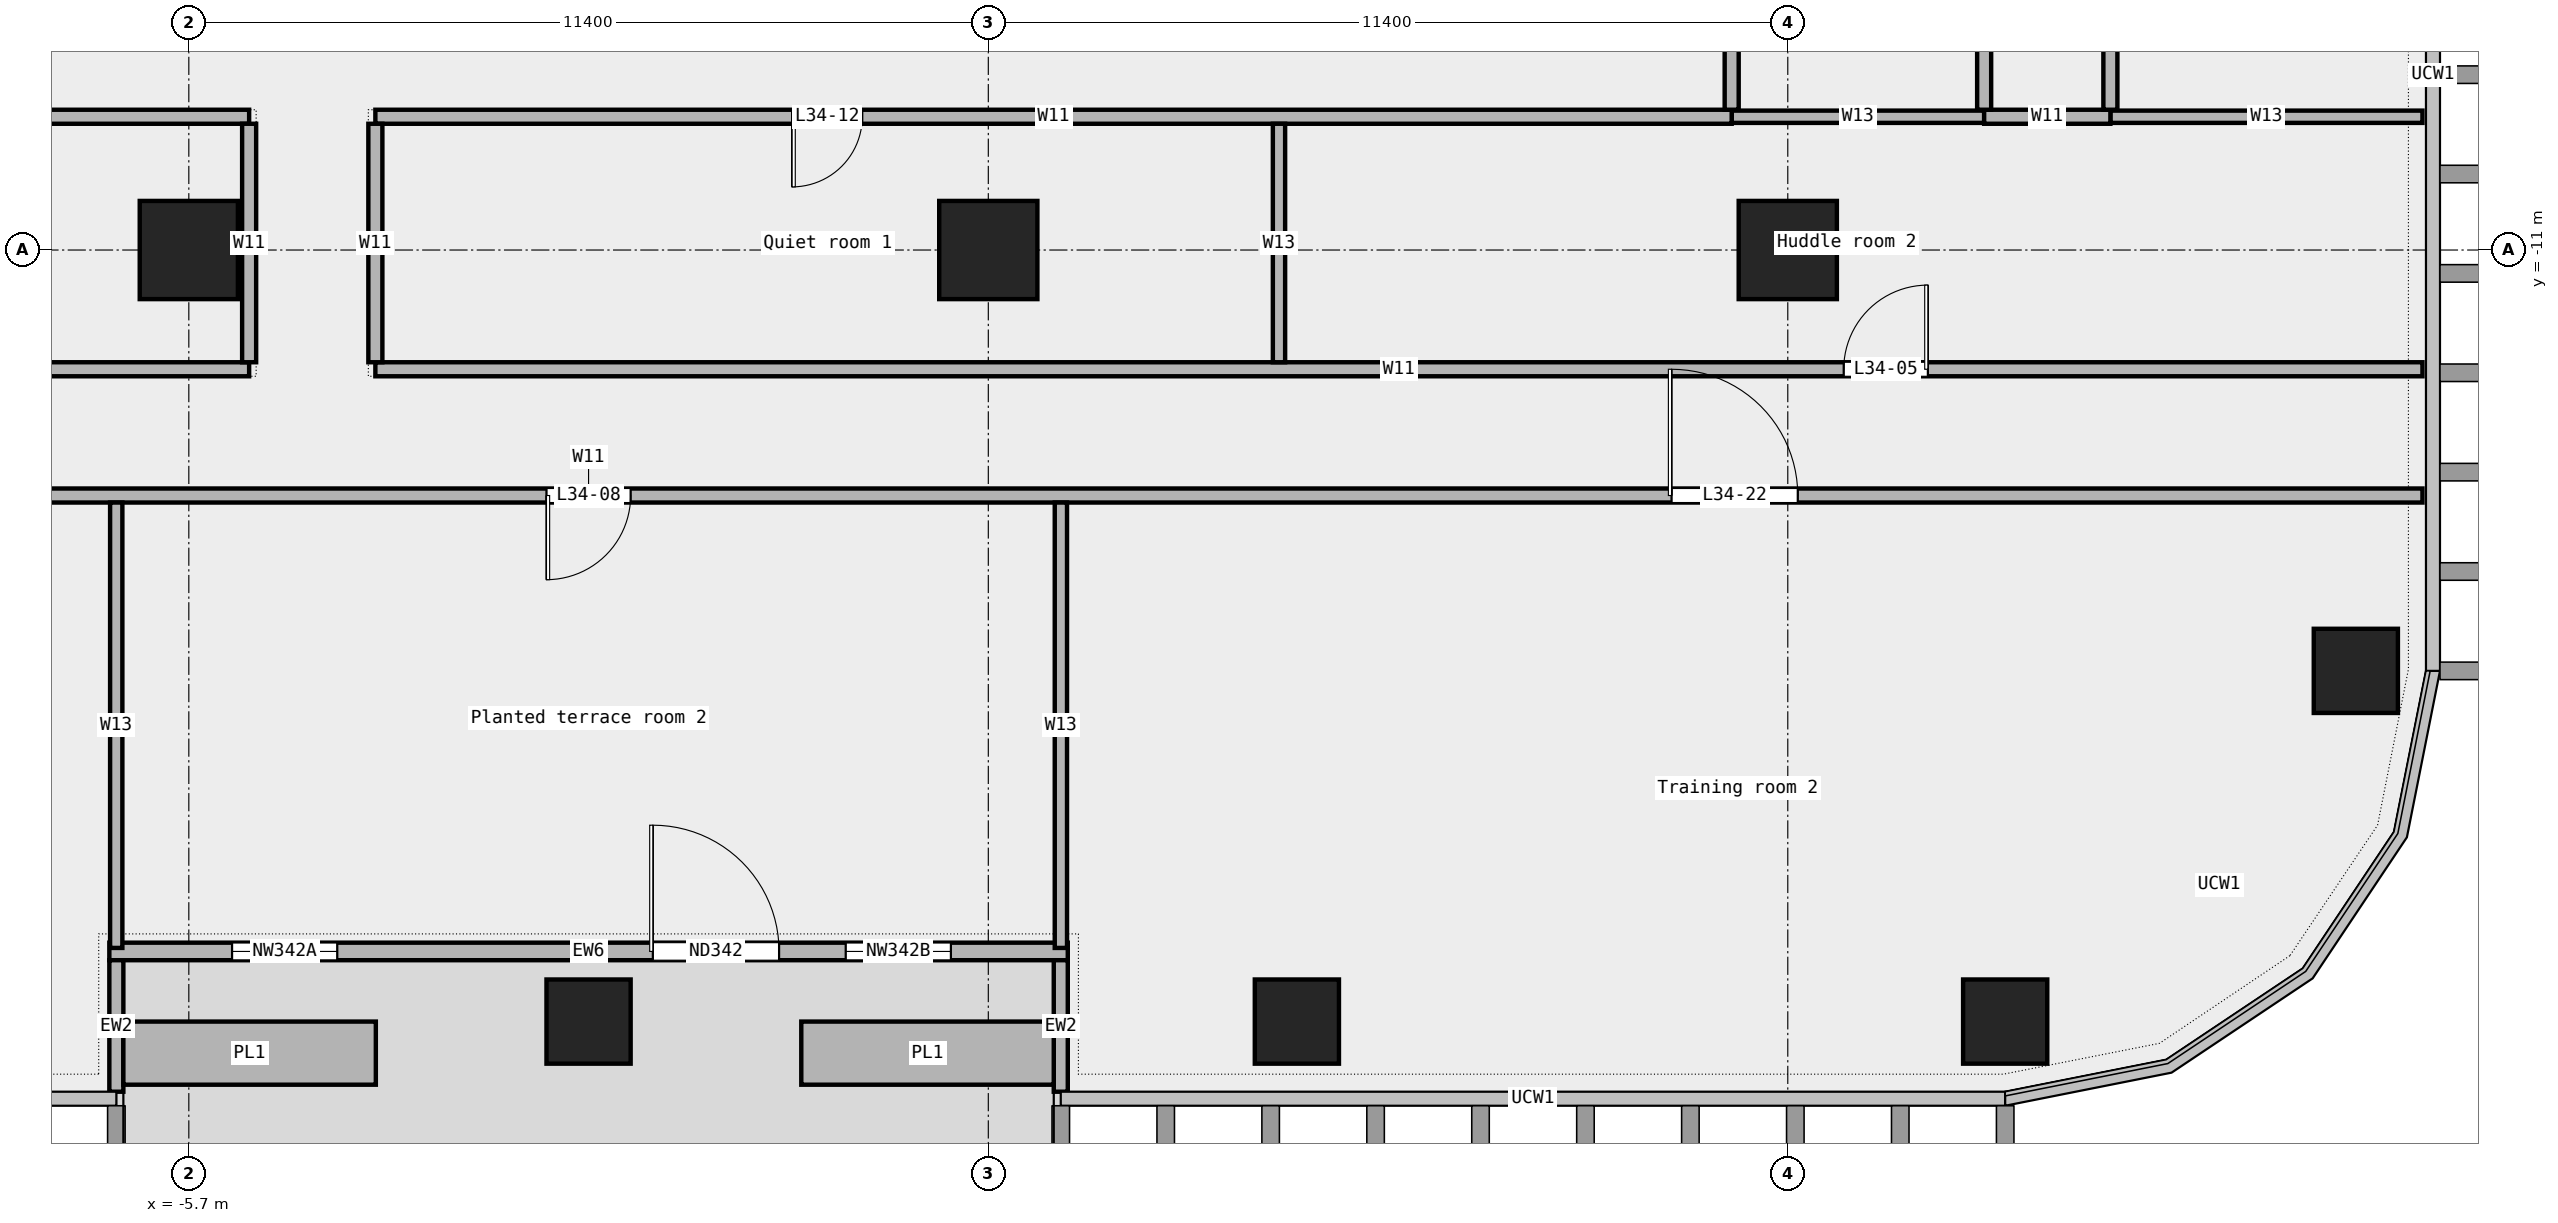
"""IFC4 building model, lengths in metres.
Left out: names, types, materials, properties, quantities, classifications, styles, units other than length and angle.
Written with IfcOpenShell. Run it as: python <this file> out.ifc"""

import sys

from ifc_helpers import new_model, si_unit, direction, frame, frame_2d, origin, origin_2d, place, context, subcontext, project, spatial, rectangle, extrude, element, fill, save


model = new_model("IFC4")
c1 = context("Model", 3, precision=1e-05, world=origin(), true_north=direction((0.0, 1.0)))
c2 = subcontext(c1, "Body", "Model", "MODEL_VIEW")
j1 = project(units=[si_unit("LENGTHUNIT", "METRE"), si_unit("PLANEANGLEUNIT", "RADIAN")], contexts=[c1])
p1 = place(None, origin())
s1 = spatial("IfcSite", under=j1, at=p1, CompositionType="ELEMENT")
p2 = place(p1, origin())
s2 = spatial("IfcBuilding", under=s1, at=p2, CompositionType="ELEMENT")
p3 = place(p2, frame((0.0, 0.0, 169.0)))
s3 = spatial("IfcBuildingStorey", under=s2, at=p3, CompositionType="ELEMENT", Elevation=169.0)
for number, where, z_axis, x_axis in (
    (1, (0.0, -22.0, 0.0), (0.0, 0.0, 1.0), (1.0, 0.0, 0.0)),
    (2, (10.1, -22.0, 0.0), (0.0, 0.0, 1.0), (1.0, 0.0, 0.0)),
    (3, (20.2, -22.0, 0.0), (0.0, 0.0, 1.0), (1.0, 0.0, 0.0)),
    (4, (25.2, -17.0, 0.0), (0.0, 0.0, 1.0), (1.0, 0.0, 0.0)),
):
    element("IfcColumn", number, at=place(p3, frame(where, z_axis=z_axis, x_axis=x_axis)), inside=s3, PredefinedType="COLUMN", context=c2, shape_type="SweptSolid", body=[
        extrude(rectangle(XDim=1.2, YDim=1.2, at=origin_2d()), origin(), (0.0, 0.0, 1.0), 3.6),
    ])
for number, where, z_axis, x_axis in (
    (5, (-5.7, -11.0, 0.0), (0.0, 0.0, 1.0), (1.0, 0.0, 0.0)),
    (6, (5.7, -11.0, 0.0), (0.0, 0.0, 1.0), (1.0, 0.0, 0.0)),
    (7, (17.1, -11.0, 0.0), (0.0, 0.0, 1.0), (1.0, 0.0, 0.0)),
):
    element("IfcColumn", number, at=place(p3, frame(where, z_axis=z_axis, x_axis=x_axis)), inside=s3, PredefinedType="COLUMN", context=c2, shape_type="SweptSolid", body=[
        extrude(rectangle(XDim=1.4, YDim=1.4, at=origin_2d()), origin(), (0.0, 0.0, 1.0), 3.6),
    ])
p4 = place(p3, frame((-6.833, -21.0, 0.0), z_axis=(0.0, 0.0, 1.0), x_axis=(1.0, 0.0, 0.0)))
e8 = element("IfcWall", 8, at=p4, inside=s3, PredefinedType="STANDARD", context=c2, shape_type="SweptSolid", body=[
    extrude(rectangle(XDim=13.667, YDim=0.25, at=frame_2d((6.833, 0.0))), origin(), (0.0, 0.0, 1.0), 3.6),
])
p5 = place(p4, frame((1.75, 0.0, 0.45)))
e9 = element("IfcOpeningElement", 9, at=p5, cuts=e8, PredefinedType="OPENING", context=c2, shape_type="SweptSolid", body=[
    extrude(rectangle(XDim=1.5, YDim=2.4, at=frame_2d((0.75, 1.2))), frame((0.0, 0.137, 0.0), z_axis=(0.0, -1.0, 0.0), x_axis=(1.0, 0.0, 0.0)), (0.0, 0.0, 1.0), 0.274),
])
p6 = place(p4, frame((7.75, 0.0, 0.0)))
e10 = element("IfcOpeningElement", 10, at=p6, cuts=e8, PredefinedType="OPENING", context=c2, shape_type="SweptSolid", body=[
    extrude(rectangle(XDim=1.8, YDim=2.4, at=frame_2d((0.9, 1.2))), frame((0.0, 0.137, 0.0), z_axis=(0.0, -1.0, 0.0), x_axis=(1.0, 0.0, 0.0)), (0.0, 0.0, 1.0), 0.274),
])
p7 = place(p4, frame((10.5, 0.0, 0.45)))
e11 = element("IfcOpeningElement", 11, at=p7, cuts=e8, PredefinedType="OPENING", context=c2, shape_type="SweptSolid", body=[
    extrude(rectangle(XDim=1.5, YDim=2.4, at=frame_2d((0.75, 1.2))), frame((0.0, 0.137, 0.0), z_axis=(0.0, -1.0, 0.0), x_axis=(1.0, 0.0, 0.0)), (0.0, 0.0, 1.0), 0.274),
])
for number, where, z_axis, x_axis in (
    (12, (-6.733, -23.0, 0.0), (0.0, 0.0, 1.0), (0.0, 1.0, 0.0)),
    (13, (6.733, -23.0, 0.0), (0.0, 0.0, 1.0), (0.0, 1.0, 0.0)),
):
    element("IfcWall", number, at=place(p3, frame(where, z_axis=z_axis, x_axis=x_axis)), inside=s3, PredefinedType="STANDARD", context=c2, shape_type="SweptSolid", body=[
        extrude(rectangle(XDim=1.875, YDim=0.2, at=frame_2d((0.938, 0.0))), origin(), (0.0, 0.0, 1.0), 3.6),
    ])
for number, where, z_axis, x_axis in (
    (14, (-6.633, -22.45, 0.0), (0.0, 0.0, 1.0), (1.0, 0.0, 0.0)),
    (15, (3.033, -22.45, 0.0), (0.0, 0.0, 1.0), (1.0, 0.0, 0.0)),
):
    element("IfcWall", number, at=place(p3, frame(where, z_axis=z_axis, x_axis=x_axis)), inside=s3, PredefinedType="STANDARD", context=c2, shape_type="SweptSolid", body=[
        extrude(rectangle(XDim=3.6, YDim=0.9, at=frame_2d((1.8, 0.0))), origin(), (0.0, 0.0, 1.0), 0.7),
    ])
p8 = place(p3, frame((-26.15, -14.5, 0.0), z_axis=(0.0, 0.0, 1.0), x_axis=(1.0, 0.0, 0.0)))
e16 = element("IfcWall", 16, at=p8, inside=s3, PredefinedType="PARTITIONING", context=c2, shape_type="SweptSolid", body=[
    extrude(rectangle(XDim=52.3, YDim=0.2, at=frame_2d((26.15, 0.0))), origin(), (0.0, 0.0, 1.0), 3.6),
])
p9 = place(p8, frame((8.907, 0.0, 0.0)))
e17 = element("IfcOpeningElement", 17, at=p9, cuts=e16, PredefinedType="OPENING", context=c2, shape_type="SweptSolid", body=[
    extrude(rectangle(XDim=1.8, YDim=2.1, at=frame_2d((0.9, 1.05))), frame((0.0, 0.112, 0.0), z_axis=(0.0, -1.0, 0.0), x_axis=(1.0, 0.0, 0.0)), (0.0, 0.0, 1.0), 0.224),
])
p10 = place(p8, frame((25.55, 0.0, 0.0)))
e18 = element("IfcOpeningElement", 18, at=p10, cuts=e16, PredefinedType="OPENING", context=c2, shape_type="SweptSolid", body=[
    extrude(rectangle(XDim=1.2, YDim=2.1, at=frame_2d((0.6, 1.05))), frame((0.0, 0.112, 0.0), z_axis=(0.0, -1.0, 0.0), x_axis=(1.0, 0.0, 0.0)), (0.0, 0.0, 1.0), 0.224),
])
p11 = place(p8, frame((41.593, 0.0, 0.0)))
e19 = element("IfcOpeningElement", 19, at=p11, cuts=e16, PredefinedType="OPENING", context=c2, shape_type="SweptSolid", body=[
    extrude(rectangle(XDim=1.8, YDim=2.1, at=frame_2d((0.9, 1.05))), frame((0.0, 0.112, 0.0), z_axis=(0.0, -1.0, 0.0), x_axis=(1.0, 0.0, 0.0)), (0.0, 0.0, 1.0), 0.224),
])
p12 = place(p3, frame((-26.15, -12.7, 0.0), z_axis=(0.0, 0.0, 1.0), x_axis=(1.0, 0.0, 0.0)))
e20 = element("IfcWall", 20, at=p12, inside=s3, PredefinedType="PARTITIONING", context=c2, shape_type="SweptSolid", body=[
    extrude(rectangle(XDim=21.31, YDim=0.2, at=frame_2d((10.655, 0.0))), origin(), (0.0, 0.0, 1.0), 3.6),
])
p13 = place(p12, frame((3.597, 0.0, 0.0)))
e21 = element("IfcOpeningElement", 21, at=p13, cuts=e20, PredefinedType="OPENING", context=c2, shape_type="SweptSolid", body=[
    extrude(rectangle(XDim=0.9, YDim=2.1, at=frame_2d((0.45, 1.05))), frame((0.0, 0.112, 0.0), z_axis=(0.0, -1.0, 0.0), x_axis=(1.0, 0.0, 0.0)), (0.0, 0.0, 1.0), 0.224),
])
p14 = place(p12, frame((14.002, 0.0, 0.0)))
e22 = element("IfcOpeningElement", 22, at=p14, cuts=e20, PredefinedType="OPENING", context=c2, shape_type="SweptSolid", body=[
    extrude(rectangle(XDim=1.2, YDim=2.1, at=frame_2d((0.6, 1.05))), frame((0.0, 0.112, 0.0), z_axis=(0.0, -1.0, 0.0), x_axis=(1.0, 0.0, 0.0)), (0.0, 0.0, 1.0), 0.224),
])
p15 = place(p3, frame((-3.04, -12.7, 0.0), z_axis=(0.0, 0.0, 1.0), x_axis=(1.0, 0.0, 0.0)))
e23 = element("IfcWall", 23, at=p15, inside=s3, PredefinedType="PARTITIONING", context=c2, shape_type="SweptSolid", body=[
    extrude(rectangle(XDim=29.19, YDim=0.2, at=frame_2d((14.595, 0.0))), origin(), (0.0, 0.0, 1.0), 3.6),
])
p16 = place(p15, frame((20.938, 0.0, 0.0)))
e24 = element("IfcOpeningElement", 24, at=p16, cuts=e23, PredefinedType="OPENING", context=c2, shape_type="SweptSolid", body=[
    extrude(rectangle(XDim=1.2, YDim=2.1, at=frame_2d((0.6, 1.05))), frame((0.0, 0.112, 0.0), z_axis=(0.0, -1.0, 0.0), x_axis=(1.0, 0.0, 0.0)), (0.0, 0.0, 1.0), 0.224),
])
p17 = place(p3, frame((16.3, -9.1, 0.0), z_axis=(0.0, 0.0, 1.0), x_axis=(1.0, 0.0, 0.0)))
e25 = element("IfcWall", 25, at=p17, inside=s3, PredefinedType="PARTITIONING", context=c2, shape_type="SweptSolid", body=[
    extrude(rectangle(XDim=3.6, YDim=0.175, at=frame_2d((1.8, 0.0))), origin(), (0.0, 0.0, 1.0), 3.6),
])
p18 = place(p3, frame((21.7, -9.1, 0.0), z_axis=(0.0, 0.0, 1.0), x_axis=(1.0, 0.0, 0.0)))
e26 = element("IfcWall", 26, at=p18, inside=s3, PredefinedType="PARTITIONING", context=c2, shape_type="SweptSolid", body=[
    extrude(rectangle(XDim=4.45, YDim=0.175, at=frame_2d((2.225, 0.0))), origin(), (0.0, 0.0, 1.0), 3.6),
])
p19 = place(p3, frame((-16.3, -9.1, 0.0), z_axis=(0.0, 0.0, 1.0), x_axis=(1.0, 0.0, 0.0)))
e27 = element("IfcWall", 27, at=p19, inside=s3, PredefinedType="PARTITIONING", context=c2, shape_type="SweptSolid", body=[
    extrude(rectangle(XDim=11.46, YDim=0.2, at=frame_2d((5.73, 0.0))), origin(), (0.0, 0.0, 1.0), 3.6),
])
p20 = place(p3, frame((-3.04, -9.1, 0.0), z_axis=(0.0, 0.0, 1.0), x_axis=(1.0, 0.0, 0.0)))
e28 = element("IfcWall", 28, at=p20, inside=s3, PredefinedType="PARTITIONING", context=c2, shape_type="SweptSolid", body=[
    extrude(rectangle(XDim=19.34, YDim=0.2, at=frame_2d((9.67, 0.0))), origin(), (0.0, 0.0, 1.0), 3.6),
])
p21 = place(p20, frame((5.942, 0.0, 0.0)))
e29 = element("IfcOpeningElement", 29, at=p21, cuts=e28, PredefinedType="OPENING", context=c2, shape_type="SweptSolid", body=[
    extrude(rectangle(XDim=1.0, YDim=2.1, at=frame_2d((0.5, 1.05))), frame((0.0, 0.112, 0.0), z_axis=(0.0, -1.0, 0.0), x_axis=(1.0, 0.0, 0.0)), (0.0, 0.0, 1.0), 0.224),
])
p22 = place(p3, frame((19.9, -9.1, 0.0), z_axis=(0.0, 0.0, 1.0), x_axis=(1.0, 0.0, 0.0)))
e30 = element("IfcWall", 30, at=p22, inside=s3, PredefinedType="PARTITIONING", context=c2, shape_type="SweptSolid", body=[
    extrude(rectangle(XDim=1.8, YDim=0.2, at=frame_2d((0.9, 0.0))), origin(), (0.0, 0.0, 1.0), 3.6),
])
p23 = place(p3, frame((-6.735, -20.95, 0.0), z_axis=(0.0, 0.0, 1.0), x_axis=(0.0, 1.0, 0.0)))
e31 = element("IfcWall", 31, at=p23, inside=s3, PredefinedType="PARTITIONING", context=c2, shape_type="SweptSolid", body=[
    extrude(rectangle(XDim=6.35, YDim=0.175, at=frame_2d((3.175, 0.0))), origin(), (0.0, 0.0, 1.0), 3.6),
])
for number, where, z_axis, x_axis in (
    (32, (-4.84, -12.6, 0.0), (0.0, 0.0, 1.0), (0.0, 1.0, 0.0)),
    (33, (-3.04, -12.6, 0.0), (0.0, 0.0, 1.0), (0.0, 1.0, 0.0)),
):
    element("IfcWall", number, at=place(p3, frame(where, z_axis=z_axis, x_axis=x_axis)), inside=s3, PredefinedType="PARTITIONING", context=c2, shape_type="SweptSolid", body=[
        extrude(rectangle(XDim=3.4, YDim=0.2, at=frame_2d((1.7, 0.0))), origin(), (0.0, 0.0, 1.0), 3.6),
    ])
p24 = place(p3, frame((6.735, -20.95, 0.0), z_axis=(0.0, 0.0, 1.0), x_axis=(0.0, 1.0, 0.0)))
e34 = element("IfcWall", 34, at=p24, inside=s3, PredefinedType="PARTITIONING", context=c2, shape_type="SweptSolid", body=[
    extrude(rectangle(XDim=6.35, YDim=0.175, at=frame_2d((3.175, 0.0))), origin(), (0.0, 0.0, 1.0), 3.6),
])
p25 = place(p3, frame((9.845, -12.6, 0.0), z_axis=(0.0, 0.0, 1.0), x_axis=(0.0, 1.0, 0.0)))
e35 = element("IfcWall", 35, at=p25, inside=s3, PredefinedType="PARTITIONING", context=c2, shape_type="SweptSolid", body=[
    extrude(rectangle(XDim=3.4, YDim=0.175, at=frame_2d((1.7, 0.0))), origin(), (0.0, 0.0, 1.0), 3.6),
])
p26 = place(p3, frame((16.3, -9.0, 0.0), z_axis=(0.0, 0.0, 1.0), x_axis=(0.0, 1.0, 0.0)))
e36 = element("IfcWall", 36, at=p26, inside=s3, PredefinedType="PARTITIONING", context=c2, shape_type="SweptSolid", body=[
    extrude(rectangle(XDim=6.25, YDim=0.2, at=frame_2d((3.125, 0.0))), origin(), (0.0, 0.0, 1.0), 3.6),
])
p27 = place(p3, frame((19.9, -9.0, 0.0), z_axis=(0.0, 0.0, 1.0), x_axis=(0.0, 1.0, 0.0)))
e37 = element("IfcWall", 37, at=p27, inside=s3, PredefinedType="PARTITIONING", context=c2, shape_type="SweptSolid", body=[
    extrude(rectangle(XDim=6.25, YDim=0.2, at=frame_2d((3.125, 0.0))), origin(), (0.0, 0.0, 1.0), 3.6),
])
p28 = place(p27, frame((2.675, 0.0, 0.0)))
e38 = element("IfcOpeningElement", 38, at=p28, cuts=e37, PredefinedType="OPENING", context=c2, shape_type="SweptSolid", body=[
    extrude(rectangle(XDim=0.9, YDim=2.1, at=frame_2d((0.45, 1.05))), frame((0.0, 0.112, 0.0), z_axis=(0.0, -1.0, 0.0), x_axis=(1.0, 0.0, 0.0)), (0.0, 0.0, 1.0), 0.224),
])
p29 = place(p3, frame((21.7, -9.0, 0.0), z_axis=(0.0, 0.0, 1.0), x_axis=(0.0, 1.0, 0.0)))
e39 = element("IfcWall", 39, at=p29, inside=s3, PredefinedType="PARTITIONING", context=c2, shape_type="SweptSolid", body=[
    extrude(rectangle(XDim=24.3, YDim=0.2, at=frame_2d((12.15, 0.0))), origin(), (0.0, 0.0, 1.0), 3.6),
])
p30 = place(p29, frame((3.583, 0.0, 0.0)))
e40 = element("IfcOpeningElement", 40, at=p30, cuts=e39, PredefinedType="OPENING", context=c2, shape_type="SweptSolid", body=[
    extrude(rectangle(XDim=0.9, YDim=2.1, at=frame_2d((0.45, 1.05))), frame((0.0, 0.112, 0.0), z_axis=(0.0, -1.0, 0.0), x_axis=(1.0, 0.0, 0.0)), (0.0, 0.0, 1.0), 0.224),
])
p31 = place(p29, frame((22.575, 0.0, 0.0)))
e41 = element("IfcOpeningElement", 41, at=p31, cuts=e39, PredefinedType="OPENING", context=c2, shape_type="SweptSolid", body=[
    extrude(rectangle(XDim=0.9, YDim=2.1, at=frame_2d((0.45, 1.05))), frame((0.0, 0.112, 0.0), z_axis=(0.0, -1.0, 0.0), x_axis=(1.0, 0.0, 0.0)), (0.0, 0.0, 1.0), 0.224),
])
p32 = place(p29, frame((14.925, 0.0, 0.0)))
e42 = element("IfcOpeningElement", 42, at=p32, cuts=e39, PredefinedType="OPENING", context=c2, shape_type="SweptSolid", body=[
    extrude(rectangle(XDim=0.9, YDim=2.1, at=frame_2d((0.45, 1.05))), frame((0.0, 0.112, 0.0), z_axis=(0.0, -1.0, 0.0), x_axis=(1.0, 0.0, 0.0)), (0.0, 0.0, 1.0), 0.224),
])
p33 = place(p5, origin())
e43 = element("IfcWindow", 43, at=p33, inside=s3, PartitioningType="SINGLE_PANEL", PredefinedType="WINDOW", context=c2, shape_type="SweptSolid", body=[
    extrude(rectangle(XDim=1.5, YDim=2.4, at=frame_2d((0.75, 1.2))), frame((0.0, 0.03, 0.0), z_axis=(0.0, -1.0, 0.0), x_axis=(1.0, 0.0, 0.0)), (0.0, 0.0, 1.0), 0.06),
])
fill(e9, e43)
p34 = place(p6, origin())
e44 = element("IfcDoor", 44, at=p34, inside=s3, OperationType="DOUBLE_DOOR_SINGLE_SWING", PredefinedType="DOOR", context=c2, shape_type="SweptSolid", body=[
    extrude(rectangle(XDim=1.8, YDim=2.4, at=frame_2d((0.9, 1.2))), frame((0.0, 0.025, 0.0), z_axis=(0.0, -1.0, 0.0), x_axis=(1.0, 0.0, 0.0)), (0.0, 0.0, 1.0), 0.05),
])
fill(e10, e44)
p35 = place(p7, origin())
e45 = element("IfcWindow", 45, at=p35, inside=s3, PartitioningType="SINGLE_PANEL", PredefinedType="WINDOW", context=c2, shape_type="SweptSolid", body=[
    extrude(rectangle(XDim=1.5, YDim=2.4, at=frame_2d((0.75, 1.2))), frame((0.0, 0.03, 0.0), z_axis=(0.0, -1.0, 0.0), x_axis=(1.0, 0.0, 0.0)), (0.0, 0.0, 1.0), 0.06),
])
fill(e11, e45)
p36 = place(p16, origin())
e46 = element("IfcDoor", 46, at=p36, inside=s3, OperationType="SINGLE_SWING_RIGHT", PredefinedType="DOOR", context=c2, shape_type="SweptSolid", body=[
    extrude(rectangle(XDim=1.2, YDim=2.1, at=frame_2d((0.6, 1.05))), frame((0.0, 0.025, 0.0), z_axis=(0.0, -1.0, 0.0), x_axis=(1.0, 0.0, 0.0)), (0.0, 0.0, 1.0), 0.05),
])
fill(e24, e46)
p37 = place(p10, origin())
e47 = element("IfcDoor", 47, at=p37, inside=s3, OperationType="SINGLE_SWING_RIGHT", PredefinedType="DOOR", context=c2, shape_type="SweptSolid", body=[
    extrude(rectangle(XDim=1.2, YDim=2.1, at=frame_2d((0.6, 1.05))), frame((0.0, 0.025, 0.0), z_axis=(0.0, -1.0, 0.0), x_axis=(1.0, 0.0, 0.0)), (0.0, 0.0, 1.0), 0.05),
])
fill(e18, e47)
p38 = place(p21, origin())
e48 = element("IfcDoor", 48, at=p38, inside=s3, OperationType="SINGLE_SWING_RIGHT", PredefinedType="DOOR", context=c2, shape_type="SweptSolid", body=[
    extrude(rectangle(XDim=1.0, YDim=2.1, at=frame_2d((0.5, 1.05))), frame((0.0, 0.025, 0.0), z_axis=(0.0, -1.0, 0.0), x_axis=(1.0, 0.0, 0.0)), (0.0, 0.0, 1.0), 0.05),
])
fill(e29, e48)
p39 = place(p11, origin())
e49 = element("IfcDoor", 49, at=p39, inside=s3, OperationType="DOUBLE_DOOR_SINGLE_SWING", PredefinedType="DOOR", context=c2, shape_type="SweptSolid", body=[
    extrude(rectangle(XDim=1.8, YDim=2.1, at=frame_2d((0.9, 1.05))), frame((0.0, 0.025, 0.0), z_axis=(0.0, -1.0, 0.0), x_axis=(1.0, 0.0, 0.0)), (0.0, 0.0, 1.0), 0.05),
])
fill(e19, e49)
save(model, sys.argv[1])
